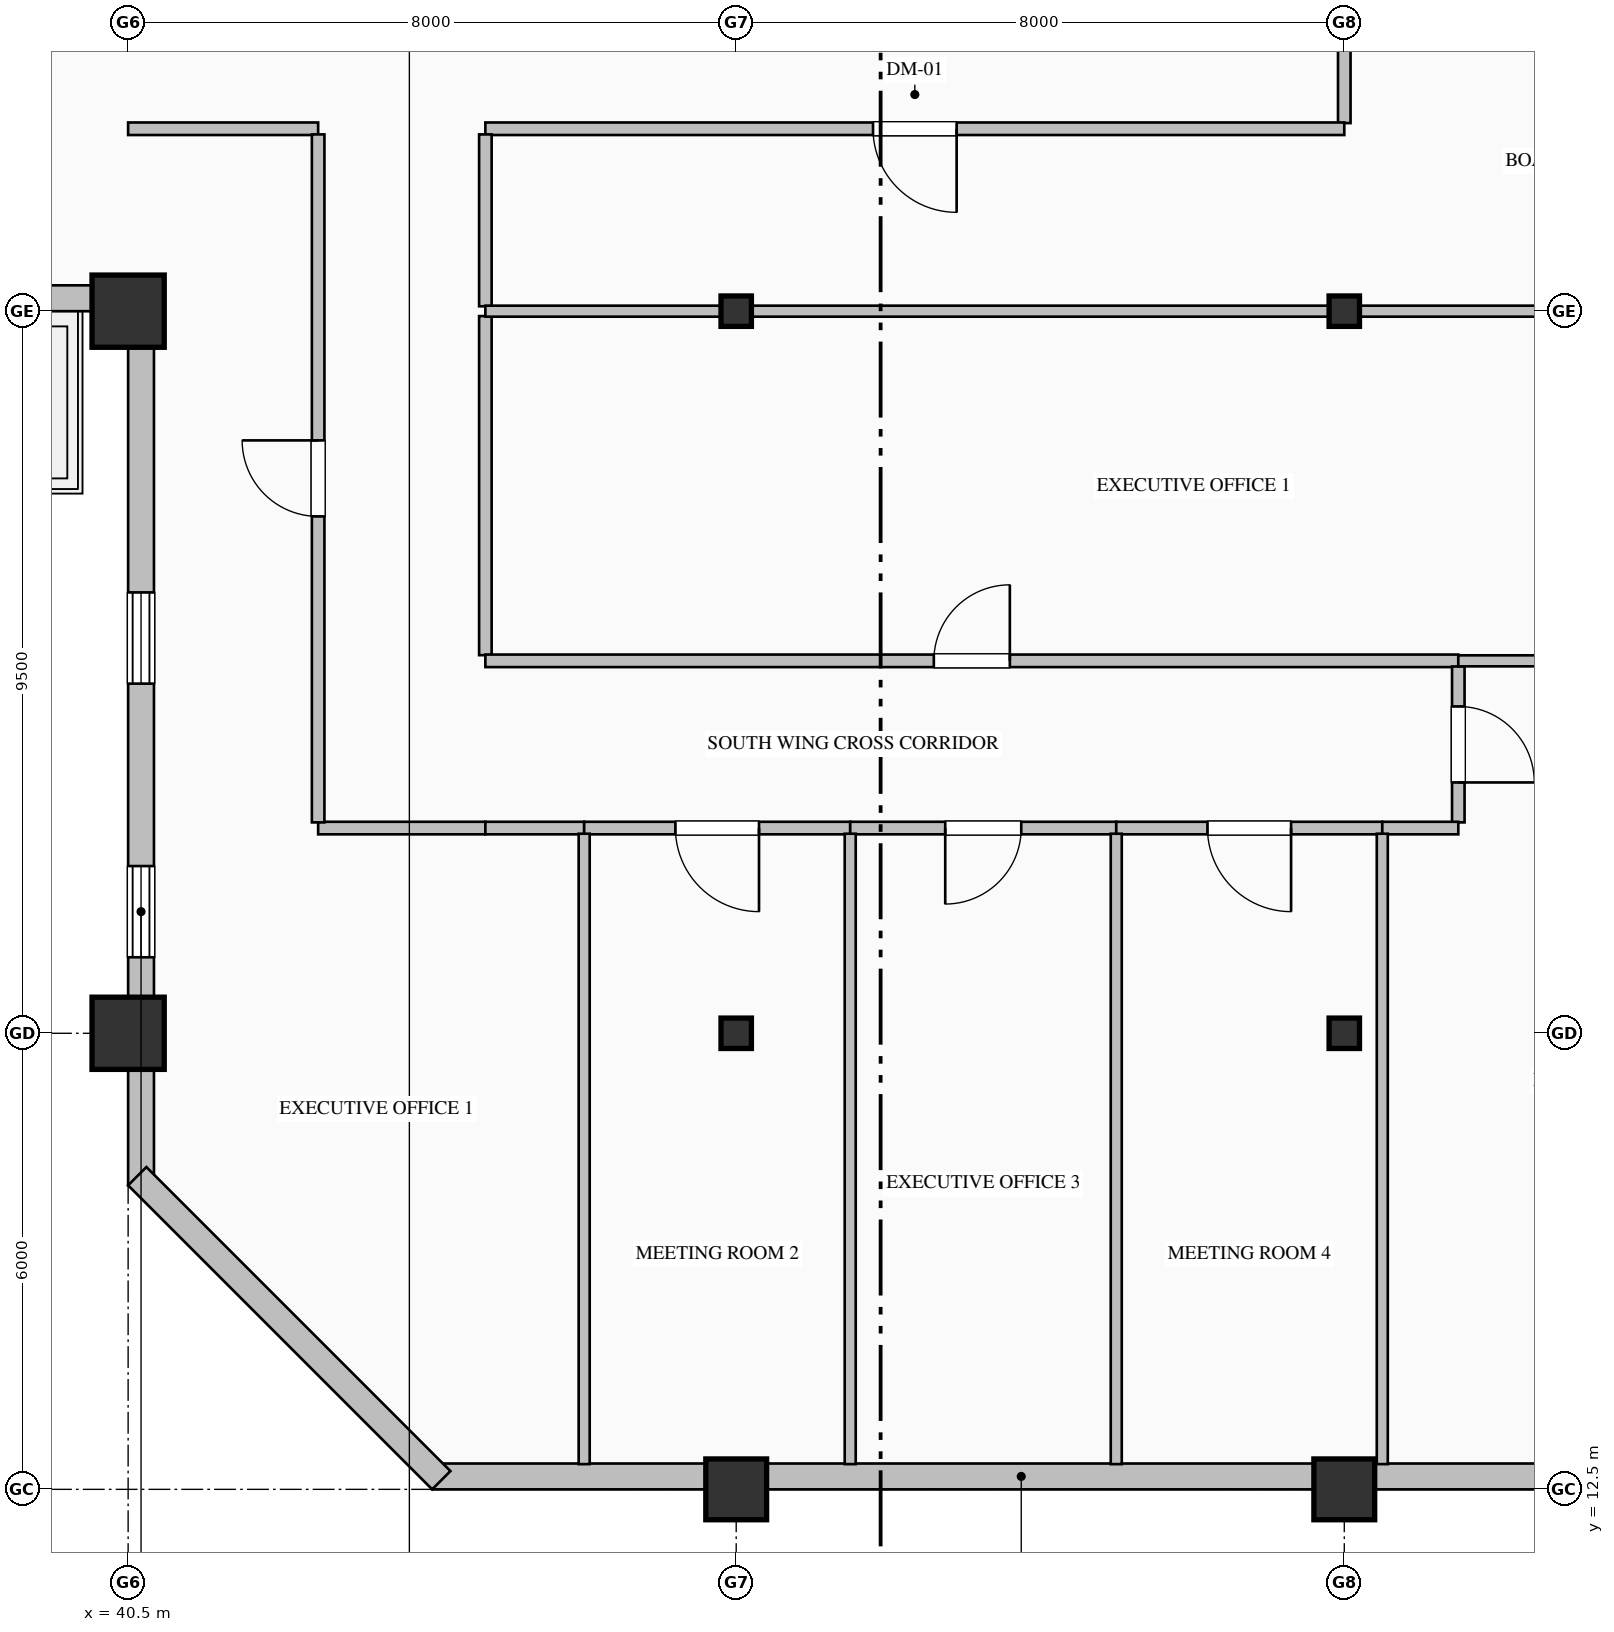
"""IFC4 building model, lengths in metres.
Left out: names, types, materials, properties, quantities, classifications, styles, units other than length and angle.
Written with IfcOpenShell. Run it as: python <this file> out.ifc"""

import sys

from ifc_helpers import new_model, si_unit, direction, frame, frame_2d, origin, origin_2d, place, context, subcontext, project, spatial, rectangle, hollow_rectangle, i_section, extrude, element, fill, save


model = new_model("IFC4")
c1 = context("Model", 3, precision=1e-05, world=origin(), true_north=direction((0.0, 1.0)))
c2 = subcontext(c1, "Body", "Model", "MODEL_VIEW")
j1 = project(units=[si_unit("LENGTHUNIT", "METRE"), si_unit("PLANEANGLEUNIT", "RADIAN")], contexts=[c1])
p1 = place(None, origin())
s1 = spatial("IfcSite", under=j1, at=p1, CompositionType="ELEMENT")
p2 = place(p1, origin())
s2 = spatial("IfcBuilding", under=s1, at=p2, CompositionType="ELEMENT")
p3 = place(p2, frame((0.0, 0.0, 209.8)))
s3 = spatial("IfcBuildingStorey", under=s2, at=p3, CompositionType="ELEMENT", Elevation=209.8)
for number, where, z_axis, x_axis in (
    (1, (40.5, 18.5, 0.0), (0.0, 0.0, 1.0), (1.0, 0.0, 0.0)),
    (2, (40.5, 28.0, 0.0), (0.0, 0.0, 1.0), (1.0, 0.0, 0.0)),
):
    element("IfcColumn", number, at=place(p3, frame(where, z_axis=z_axis, x_axis=x_axis)), inside=s3, PredefinedType="COLUMN", context=c2, shape_type="SweptSolid", body=[
        extrude(hollow_rectangle(XDim=0.95, YDim=0.95, WallThickness=0.036, at=origin_2d()), origin(), (0.0, 0.0, 1.0), 4.0),
    ])
p4 = place(p3, frame((48.5, 12.5, 0.0), z_axis=(0.0, 0.0, 1.0), x_axis=(1.0, 0.0, 0.0)))
e3 = element("IfcColumn", 3, at=p4, inside=s3, PredefinedType="COLUMN", context=c2, shape_type="SweptSolid", body=[
    extrude(hollow_rectangle(XDim=0.8, YDim=0.8, WallThickness=0.032, at=origin_2d()), origin(), (0.0, 0.0, 1.0), 4.0),
])
for number, where, z_axis, x_axis in (
    (4, (48.5, 18.5, 0.0), (0.0, 0.0, 1.0), (1.0, 0.0, 0.0)),
    (5, (48.5, 28.0, 0.0), (0.0, 0.0, 1.0), (1.0, 0.0, 0.0)),
):
    element("IfcColumn", number, at=place(p3, frame(where, z_axis=z_axis, x_axis=x_axis)), inside=s3, PredefinedType="COLUMN", context=c2, shape_type="SweptSolid", body=[
        extrude(i_section(OverallWidth=0.4, OverallDepth=0.4, WebThickness=0.013, FlangeThickness=0.021, FilletRadius=0.022, at=origin_2d()), origin(), (0.0, 0.0, 1.0), 4.0),
    ])
p5 = place(p3, frame((56.5, 12.5, 0.0), z_axis=(0.0, 0.0, 1.0), x_axis=(1.0, 0.0, 0.0)))
e6 = element("IfcColumn", 6, at=p5, inside=s3, PredefinedType="COLUMN", context=c2, shape_type="SweptSolid", body=[
    extrude(hollow_rectangle(XDim=0.8, YDim=0.8, WallThickness=0.032, at=origin_2d()), origin(), (0.0, 0.0, 1.0), 4.0),
])
for number, where, z_axis, x_axis in (
    (7, (56.5, 18.5, 0.0), (0.0, 0.0, 1.0), (1.0, 0.0, 0.0)),
    (8, (56.5, 28.0, 0.0), (0.0, 0.0, 1.0), (1.0, 0.0, 0.0)),
):
    element("IfcColumn", number, at=place(p3, frame(where, z_axis=z_axis, x_axis=x_axis)), inside=s3, PredefinedType="COLUMN", context=c2, shape_type="SweptSolid", body=[
        extrude(i_section(OverallWidth=0.4, OverallDepth=0.4, WebThickness=0.013, FlangeThickness=0.021, FilletRadius=0.022, at=origin_2d()), origin(), (0.0, 0.0, 1.0), 4.0),
    ])
p6 = place(p3, frame((40.67, 16.5, 0.0), z_axis=(0.0, 0.0, 1.0), x_axis=(0.0, 1.0, 0.0)))
e9 = element("IfcWall", 9, at=p6, inside=s3, PredefinedType="SOLIDWALL", context=c2, shape_type="SweptSolid", body=[
    extrude(rectangle(XDim=11.84, YDim=0.34, at=frame_2d((5.92, 0.0))), origin(), (0.0, 0.0, 1.0), 3.187),
])
p7 = place(p6, frame((3.0, 0.0, 0.7)))
e10 = element("IfcOpeningElement", 10, at=p7, cuts=e9, PredefinedType="OPENING", context=c2, shape_type="SweptSolid", body=[
    extrude(rectangle(XDim=1.2, YDim=1.85, at=frame_2d((0.6, 0.925))), frame((0.0, 0.18, 0.0), z_axis=(0.0, -1.0, 0.0), x_axis=(1.0, 0.0, 0.0)), (0.0, 0.0, 1.0), 0.36),
])
p8 = place(p6, frame((6.6, 0.0, 0.9)))
e11 = element("IfcOpeningElement", 11, at=p8, cuts=e9, PredefinedType="OPENING", context=c2, shape_type="SweptSolid", body=[
    extrude(rectangle(XDim=1.2, YDim=1.85, at=frame_2d((0.6, 0.925))), frame((0.0, 0.18, 0.0), z_axis=(0.0, -1.0, 0.0), x_axis=(1.0, 0.0, 0.0)), (0.0, 0.0, 1.0), 0.36),
])
p9 = place(p3, frame((40.52, 28.17, 0.0), z_axis=(0.0, 0.0, 1.0), x_axis=(-1.0, 0.0, 0.0)))
e12 = element("IfcWall", 12, at=p9, inside=s3, PredefinedType="SOLIDWALL", context=c2, shape_type="SweptSolid", body=[
    extrude(rectangle(XDim=27.52, YDim=0.34, at=frame_2d((13.76, 0.0))), origin(), (0.0, 0.0, 1.0), 3.187),
])
p10 = place(p9, frame((13.8, 0.0, 0.9)))
e13 = element("IfcOpeningElement", 13, at=p10, cuts=e12, PredefinedType="OPENING", context=c2, shape_type="SweptSolid", body=[
    extrude(rectangle(XDim=1.2, YDim=1.85, at=frame_2d((0.6, 0.925))), frame((0.0, 0.18, 0.0), z_axis=(0.0, -1.0, 0.0), x_axis=(1.0, 0.0, 0.0)), (0.0, 0.0, 1.0), 0.36),
])
p11 = place(p9, frame((17.325, 0.0, 0.9)))
e14 = element("IfcOpeningElement", 14, at=p11, cuts=e12, PredefinedType="OPENING", context=c2, shape_type="SweptSolid", body=[
    extrude(rectangle(XDim=1.35, YDim=1.85, at=frame_2d((0.675, 0.925))), frame((0.0, 0.18, 0.0), z_axis=(0.0, -1.0, 0.0), x_axis=(1.0, 0.0, 0.0)), (0.0, 0.0, 1.0), 0.36),
])
p12 = place(p9, frame((21.0, 0.0, 0.7)))
e15 = element("IfcOpeningElement", 15, at=p12, cuts=e12, PredefinedType="OPENING", context=c2, shape_type="SweptSolid", body=[
    extrude(rectangle(XDim=1.2, YDim=1.85, at=frame_2d((0.6, 0.925))), frame((0.0, 0.18, 0.0), z_axis=(0.0, -1.0, 0.0), x_axis=(1.0, 0.0, 0.0)), (0.0, 0.0, 1.0), 0.36),
])
p13 = place(p9, frame((11.395, 0.0, 0.0)))
e16 = element("IfcOpeningElement", 16, at=p13, cuts=e12, PredefinedType="OPENING", context=c2, shape_type="SweptSolid", body=[
    extrude(rectangle(XDim=1.25, YDim=2.25, at=frame_2d((0.625, 1.125))), frame((0.0, 0.18, 0.0), z_axis=(0.0, -1.0, 0.0), x_axis=(1.0, 0.0, 0.0)), (0.0, 0.0, 1.0), 0.36),
])
p14 = place(p3, frame((60.0, 12.67, 0.0), z_axis=(0.0, 0.0, 1.0), x_axis=(-1.0, 0.0, 0.0)))
e17 = element("IfcWall", 17, at=p14, inside=s3, PredefinedType="SOLIDWALL", context=c2, shape_type="SweptSolid", body=[
    extrude(rectangle(XDim=15.5, YDim=0.34, at=frame_2d((7.75, 0.0))), origin(), (0.0, 0.0, 1.0), 3.325),
])
p15 = place(p3, frame((44.62, 12.62, 0.0), z_axis=(0.0, 0.0, 1.0), x_axis=(-0.707106781187, 0.707106781187, 0.0)))
e18 = element("IfcWall", 18, at=p15, inside=s3, PredefinedType="SOLIDWALL", context=c2, shape_type="SweptSolid", body=[
    extrude(rectangle(XDim=5.657, YDim=0.34, at=frame_2d((2.828, 0.0))), origin(), (0.0, 0.0, 1.0), 3.775),
])
p16 = place(p3, frame((56.5, 31.736, 0.0), z_axis=(0.0, 0.0, 1.0), x_axis=(0.0, -1.0, 0.0)))
e19 = element("IfcWall", 19, at=p16, inside=s3, PredefinedType="PARTITIONING", context=c2, shape_type="SweptSolid", body=[
    extrude(rectangle(XDim=1.261, YDim=0.165, at=frame_2d((0.63, 0.0))), origin(), (0.0, 0.0, 1.0), 3.179),
])
p17 = place(p3, frame((56.5, 30.4, 0.0), z_axis=(0.0, 0.0, 1.0), x_axis=(-1.0, 0.0, 0.0)))
e20 = element("IfcWall", 20, at=p17, inside=s3, PredefinedType="PARTITIONING", context=c2, shape_type="SweptSolid", body=[
    extrude(rectangle(XDim=11.3, YDim=0.165, at=frame_2d((5.65, 0.0))), origin(), (0.0, 0.0, 1.0), 3.775),
])
p18 = place(p17, frame((5.1, 0.0, 0.0)))
e21 = element("IfcOpeningElement", 21, at=p18, cuts=e20, PredefinedType="OPENING", context=c2, shape_type="SweptSolid", body=[
    extrude(rectangle(XDim=1.1, YDim=2.2, at=frame_2d((0.55, 1.1))), frame((0.0, 0.093, 0.0), z_axis=(0.0, -1.0, 0.0), x_axis=(1.0, 0.0, 0.0)), (0.0, 0.0, 1.0), 0.185),
])
p19 = place(p3, frame((43.0, 30.4, 0.0), z_axis=(0.0, 0.0, 1.0), x_axis=(-1.0, 0.0, 0.0)))
e22 = element("IfcWall", 22, at=p19, inside=s3, PredefinedType="PARTITIONING", context=c2, shape_type="SweptSolid", body=[
    extrude(rectangle(XDim=2.5, YDim=0.165, at=frame_2d((1.25, 0.0))), origin(), (0.0, 0.0, 1.0), 3.775),
])
p20 = place(p3, frame((45.2, 27.936, 0.0), z_axis=(0.0, 0.0, 1.0), x_axis=(0.0, -1.0, 0.0)))
e23 = element("IfcWall", 23, at=p20, inside=s3, PredefinedType="PARTITIONING", context=c2, shape_type="SweptSolid", body=[
    extrude(rectangle(XDim=4.461, YDim=0.165, at=frame_2d((2.23, 0.0))), origin(), (0.0, 0.0, 1.0), 3.775),
])
p21 = place(p3, frame((45.2, 30.325, 0.0), z_axis=(0.0, 0.0, 1.0), x_axis=(0.0, -1.0, 0.0)))
e24 = element("IfcWall", 24, at=p21, inside=s3, PredefinedType="PARTITIONING", context=c2, shape_type="SweptSolid", body=[
    extrude(rectangle(XDim=2.261, YDim=0.165, at=frame_2d((1.13, 0.0))), origin(), (0.0, 0.0, 1.0), 3.775),
])
p22 = place(p3, frame((45.2, 21.2, 0.0), z_axis=(0.0, 0.0, 1.0), x_axis=(-1.0, 0.0, 0.0)))
e25 = element("IfcWall", 25, at=p22, inside=s3, PredefinedType="PARTITIONING", context=c2, shape_type="SweptSolid", body=[
    extrude(rectangle(XDim=2.2, YDim=0.165, at=frame_2d((1.1, 0.0))), origin(), (0.0, 0.0, 1.0), 3.775),
])
p23 = place(p3, frame((43.0, 21.274, 0.0), z_axis=(0.0, 0.0, 1.0), x_axis=(0.0, 1.0, 0.0)))
e26 = element("IfcWall", 26, at=p23, inside=s3, PredefinedType="PARTITIONING", context=c2, shape_type="SweptSolid", body=[
    extrude(rectangle(XDim=9.051, YDim=0.165, at=frame_2d((4.525, 0.0))), origin(), (0.0, 0.0, 1.0), 3.775),
])
p24 = place(p23, frame((4.025, 0.0, 0.0)))
e27 = element("IfcOpeningElement", 27, at=p24, cuts=e26, PredefinedType="OPENING", context=c2, shape_type="SweptSolid", body=[
    extrude(rectangle(XDim=1.0, YDim=2.15, at=frame_2d((0.5, 1.075))), frame((0.0, 0.093, 0.0), z_axis=(0.0, -1.0, 0.0), x_axis=(1.0, 0.0, 0.0)), (0.0, 0.0, 1.0), 0.185),
])
p25 = place(p3, frame((45.2, 23.4, 0.0), z_axis=(0.0, 0.0, 1.0), x_axis=(1.0, 0.0, 0.0)))
e28 = element("IfcWall", 28, at=p25, inside=s3, PredefinedType="PARTITIONING", context=c2, shape_type="SweptSolid", body=[
    extrude(rectangle(XDim=12.8, YDim=0.165, at=frame_2d((6.4, 0.0))), origin(), (0.0, 0.0, 1.0), 3.467),
])
p26 = place(p25, frame((5.9, 0.0, 0.0)))
e29 = element("IfcOpeningElement", 29, at=p26, cuts=e28, PredefinedType="OPENING", context=c2, shape_type="SweptSolid", body=[
    extrude(rectangle(XDim=1.0, YDim=2.15, at=frame_2d((0.5, 1.075))), frame((0.0, 0.093, 0.0), z_axis=(0.0, -1.0, 0.0), x_axis=(1.0, 0.0, 0.0)), (0.0, 0.0, 1.0), 0.185),
])
p27 = place(p3, frame((46.5, 21.2, 0.0), z_axis=(0.0, 0.0, 1.0), x_axis=(-1.0, 0.0, 0.0)))
e30 = element("IfcWall", 30, at=p27, inside=s3, PredefinedType="PARTITIONING", context=c2, shape_type="SweptSolid", body=[
    extrude(rectangle(XDim=1.3, YDim=0.165, at=frame_2d((0.65, 0.0))), origin(), (0.0, 0.0, 1.0), 3.775),
])
p28 = place(p3, frame((50.0, 21.2, 0.0), z_axis=(0.0, 0.0, 1.0), x_axis=(-1.0, 0.0, 0.0)))
e31 = element("IfcWall", 31, at=p28, inside=s3, PredefinedType="PARTITIONING", context=c2, shape_type="SweptSolid", body=[
    extrude(rectangle(XDim=3.5, YDim=0.165, at=frame_2d((1.75, 0.0))), origin(), (0.0, 0.0, 1.0), 3.775),
])
p29 = place(p28, frame((1.2, 0.0, 0.0)))
e32 = element("IfcOpeningElement", 32, at=p29, cuts=e31, PredefinedType="OPENING", context=c2, shape_type="SweptSolid", body=[
    extrude(rectangle(XDim=1.1, YDim=2.2, at=frame_2d((0.55, 1.1))), frame((0.0, 0.093, 0.0), z_axis=(0.0, -1.0, 0.0), x_axis=(1.0, 0.0, 0.0)), (0.0, 0.0, 1.0), 0.185),
])
p30 = place(p3, frame((53.5, 21.2, 0.0), z_axis=(0.0, 0.0, 1.0), x_axis=(-1.0, 0.0, 0.0)))
e33 = element("IfcWall", 33, at=p30, inside=s3, PredefinedType="PARTITIONING", context=c2, shape_type="SweptSolid", body=[
    extrude(rectangle(XDim=3.5, YDim=0.165, at=frame_2d((1.75, 0.0))), origin(), (0.0, 0.0, 1.0), 3.775),
])
p31 = place(p30, frame((1.25, 0.0, 0.0)))
e34 = element("IfcOpeningElement", 34, at=p31, cuts=e33, PredefinedType="OPENING", context=c2, shape_type="SweptSolid", body=[
    extrude(rectangle(XDim=1.0, YDim=2.15, at=frame_2d((0.5, 1.075))), frame((0.0, 0.093, 0.0), z_axis=(0.0, -1.0, 0.0), x_axis=(1.0, 0.0, 0.0)), (0.0, 0.0, 1.0), 0.185),
])
p32 = place(p3, frame((57.0, 21.2, 0.0), z_axis=(0.0, 0.0, 1.0), x_axis=(-1.0, 0.0, 0.0)))
e35 = element("IfcWall", 35, at=p32, inside=s3, PredefinedType="PARTITIONING", context=c2, shape_type="SweptSolid", body=[
    extrude(rectangle(XDim=3.5, YDim=0.165, at=frame_2d((1.75, 0.0))), origin(), (0.0, 0.0, 1.0), 3.775),
])
p33 = place(p32, frame((1.2, 0.0, 0.0)))
e36 = element("IfcOpeningElement", 36, at=p33, cuts=e35, PredefinedType="OPENING", context=c2, shape_type="SweptSolid", body=[
    extrude(rectangle(XDim=1.1, YDim=2.2, at=frame_2d((0.55, 1.1))), frame((0.0, 0.093, 0.0), z_axis=(0.0, -1.0, 0.0), x_axis=(1.0, 0.0, 0.0)), (0.0, 0.0, 1.0), 0.185),
])
p34 = place(p3, frame((58.0, 23.325, 0.0), z_axis=(0.0, 0.0, 1.0), x_axis=(0.0, -1.0, 0.0)))
e37 = element("IfcWall", 37, at=p34, inside=s3, PredefinedType="PARTITIONING", context=c2, shape_type="SweptSolid", body=[
    extrude(rectangle(XDim=2.051, YDim=0.165, at=frame_2d((1.025, 0.0))), origin(), (0.0, 0.0, 1.0), 3.775),
])
p35 = place(p34, frame((0.525, 0.0, 0.0)))
e38 = element("IfcOpeningElement", 38, at=p35, cuts=e37, PredefinedType="OPENING", context=c2, shape_type="SweptSolid", body=[
    extrude(rectangle(XDim=1.0, YDim=2.15, at=frame_2d((0.5, 1.075))), frame((0.0, 0.093, 0.0), z_axis=(0.0, -1.0, 0.0), x_axis=(1.0, 0.0, 0.0)), (0.0, 0.0, 1.0), 0.185),
])
p36 = place(p3, frame((58.0, 21.2, 0.0), z_axis=(0.0, 0.0, 1.0), x_axis=(-1.0, 0.0, 0.0)))
e39 = element("IfcWall", 39, at=p36, inside=s3, PredefinedType="PARTITIONING", context=c2, shape_type="SweptSolid", body=[
    extrude(rectangle(XDim=1.0, YDim=0.165, at=frame_2d((0.5, 0.0))), origin(), (0.0, 0.0, 1.0), 3.775),
])
p37 = place(p3, frame((45.2, 28.0, 0.0), z_axis=(0.0, 0.0, 1.0), x_axis=(1.0, 0.0, 0.0)))
e40 = element("IfcWall", 40, at=p37, inside=s3, PredefinedType="PARTITIONING", context=c2, shape_type="SweptSolid", body=[
    extrude(rectangle(XDim=18.528, YDim=0.145, at=frame_2d((9.264, 0.0))), origin(), (0.0, 0.0, 1.0), 3.179),
])
p38 = place(p3, frame((63.728, 23.4, 0.0), z_axis=(0.0, 0.0, 1.0), x_axis=(-1.0, 0.0, 0.0)))
e41 = element("IfcWall", 41, at=p38, inside=s3, PredefinedType="PARTITIONING", context=c2, shape_type="SweptSolid", body=[
    extrude(rectangle(XDim=5.728, YDim=0.145, at=frame_2d((2.864, 0.0))), origin(), (0.0, 0.0, 1.0), 3.775),
])
for number, where, z_axis, x_axis in (
    (42, (46.5, 21.125, 0.0), (0.0, 0.0, 1.0), (0.0, -1.0, 0.0)),
    (43, (50.0, 21.125, 0.0), (0.0, 0.0, 1.0), (0.0, -1.0, 0.0)),
    (44, (53.5, 21.125, 0.0), (0.0, 0.0, 1.0), (0.0, -1.0, 0.0)),
    (45, (57.0, 21.125, 0.0), (0.0, 0.0, 1.0), (0.0, -1.0, 0.0)),
):
    element("IfcWall", number, at=place(p3, frame(where, z_axis=z_axis, x_axis=x_axis)), inside=s3, PredefinedType="PARTITIONING", context=c2, shape_type="SweptSolid", body=[
        extrude(rectangle(XDim=8.293, YDim=0.145, at=frame_2d((4.147, 0.0))), origin(), (0.0, 0.0, 1.0), 3.775),
    ])
p39 = place(p7, origin())
e46 = element("IfcWindow", 46, at=p39, inside=s3, PartitioningType="DOUBLE_PANEL_VERTICAL", PredefinedType="WINDOW", context=c2, shape_type="SweptSolid", body=[
    extrude(rectangle(XDim=1.2, YDim=1.85, at=frame_2d((0.6, 0.925))), frame((0.0, 0.15, 0.0), z_axis=(0.0, -1.0, 0.0), x_axis=(1.0, 0.0, 0.0)), (0.0, 0.0, 1.0), 0.06),
])
fill(e10, e46)
p40 = place(p8, origin())
e47 = element("IfcWindow", 47, at=p40, inside=s3, PartitioningType="DOUBLE_PANEL_VERTICAL", PredefinedType="WINDOW", context=c2, shape_type="SweptSolid", body=[
    extrude(rectangle(XDim=1.2, YDim=1.85, at=frame_2d((0.6, 0.925))), frame((0.0, 0.15, 0.0), z_axis=(0.0, -1.0, 0.0), x_axis=(1.0, 0.0, 0.0)), (0.0, 0.0, 1.0), 0.06),
])
fill(e11, e47)
p41 = place(p26, origin())
e48 = element("IfcDoor", 48, at=p41, inside=s3, OperationType="SINGLE_SWING_RIGHT", PredefinedType="DOOR", context=c2, shape_type="SweptSolid", body=[
    extrude(rectangle(XDim=1.0, YDim=2.15, at=frame_2d((0.5, 1.075))), frame((0.0, 0.025, 0.0), z_axis=(0.0, -1.0, 0.0), x_axis=(1.0, 0.0, 0.0)), (0.0, 0.0, 1.0), 0.05),
])
fill(e29, e48)
p42 = place(p18, origin())
e49 = element("IfcDoor", 49, at=p42, inside=s3, OperationType="SINGLE_SWING_LEFT", PredefinedType="DOOR", context=c2, shape_type="SweptSolid", body=[
    extrude(rectangle(XDim=1.1, YDim=2.2, at=frame_2d((0.55, 1.1))), frame((0.0, 0.025, 0.0), z_axis=(0.0, -1.0, 0.0), x_axis=(1.0, 0.0, 0.0)), (0.0, 0.0, 1.0), 0.05),
])
fill(e21, e49)
p43 = place(p24, origin())
e50 = element("IfcDoor", 50, at=p43, inside=s3, OperationType="SINGLE_SWING_RIGHT", PredefinedType="DOOR", context=c2, shape_type="SweptSolid", body=[
    extrude(rectangle(XDim=1.0, YDim=2.15, at=frame_2d((0.5, 1.075))), frame((0.0, 0.025, 0.0), z_axis=(0.0, -1.0, 0.0), x_axis=(1.0, 0.0, 0.0)), (0.0, 0.0, 1.0), 0.05),
])
fill(e27, e50)
p44 = place(p29, origin())
e51 = element("IfcDoor", 51, at=p44, inside=s3, OperationType="SINGLE_SWING_LEFT", PredefinedType="DOOR", context=c2, shape_type="SweptSolid", body=[
    extrude(rectangle(XDim=1.1, YDim=2.2, at=frame_2d((0.55, 1.1))), frame((0.0, 0.025, 0.0), z_axis=(0.0, -1.0, 0.0), x_axis=(1.0, 0.0, 0.0)), (0.0, 0.0, 1.0), 0.05),
])
fill(e32, e51)
p45 = place(p31, origin())
e52 = element("IfcDoor", 52, at=p45, inside=s3, OperationType="SINGLE_SWING_RIGHT", PredefinedType="DOOR", context=c2, shape_type="SweptSolid", body=[
    extrude(rectangle(XDim=1.0, YDim=2.15, at=frame_2d((0.5, 1.075))), frame((0.0, 0.025, 0.0), z_axis=(0.0, -1.0, 0.0), x_axis=(1.0, 0.0, 0.0)), (0.0, 0.0, 1.0), 0.05),
])
fill(e34, e52)
p46 = place(p33, origin())
e53 = element("IfcDoor", 53, at=p46, inside=s3, OperationType="SINGLE_SWING_LEFT", PredefinedType="DOOR", context=c2, shape_type="SweptSolid", body=[
    extrude(rectangle(XDim=1.1, YDim=2.2, at=frame_2d((0.55, 1.1))), frame((0.0, 0.025, 0.0), z_axis=(0.0, -1.0, 0.0), x_axis=(1.0, 0.0, 0.0)), (0.0, 0.0, 1.0), 0.05),
])
fill(e36, e53)
p47 = place(p35, origin())
e54 = element("IfcDoor", 54, at=p47, inside=s3, OperationType="SINGLE_SWING_RIGHT", PredefinedType="DOOR", context=c2, shape_type="SweptSolid", body=[
    extrude(rectangle(XDim=1.0, YDim=2.15, at=frame_2d((0.5, 1.075))), frame((0.0, 0.025, 0.0), z_axis=(0.0, -1.0, 0.0), x_axis=(1.0, 0.0, 0.0)), (0.0, 0.0, 1.0), 0.05),
])
fill(e38, e54)
save(model, sys.argv[1])
